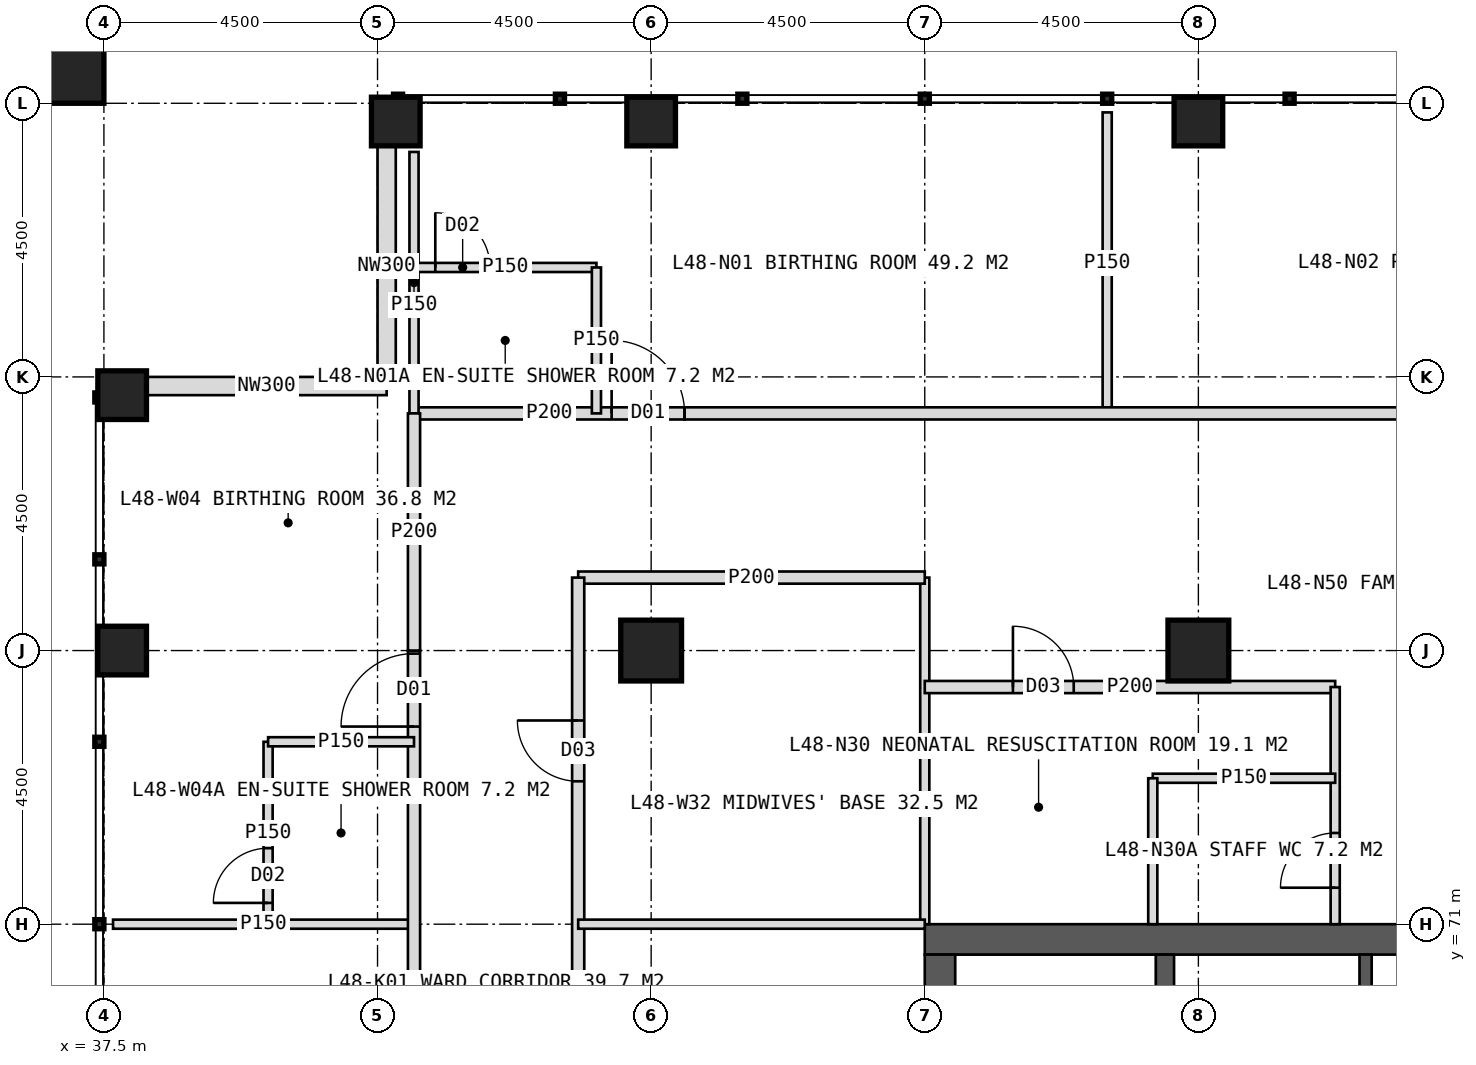
"""IFC4 building model, lengths in metres.
Left out: names, types, materials, properties, quantities, classifications, styles, units other than length and angle.
Written with IfcOpenShell. Run it as: python <this file> out.ifc"""

import sys

from ifc_helpers import new_model, si_unit, direction, frame, frame_2d, origin, origin_2d, place, context, subcontext, project, spatial, rectangle, hollow_rectangle, extrude, element, fill, save


model = new_model("IFC4")
c1 = context("Model", 3, precision=1e-05, world=origin(), true_north=direction((0.0, 1.0)))
c2 = subcontext(c1, "Body", "Model", "MODEL_VIEW")
j1 = project(units=[si_unit("LENGTHUNIT", "METRE"), si_unit("PLANEANGLEUNIT", "RADIAN")], contexts=[c1])
p1 = place(None, origin())
s1 = spatial("IfcSite", under=j1, at=p1, CompositionType="ELEMENT")
p2 = place(p1, origin())
s2 = spatial("IfcBuilding", under=s1, at=p2, CompositionType="ELEMENT")
p3 = place(p2, frame((0.0, 0.0, 201.0)))
s3 = spatial("IfcBuildingStorey", under=s2, at=p3, CompositionType="ELEMENT", Elevation=201.0)
p4 = place(p3, frame((51.0, 70.75, 0.0), z_axis=(0.0, 0.0, 1.0), x_axis=(1.0, 0.0, 0.0)))
e1 = element("IfcWall", 1, at=p4, inside=s3, PredefinedType="SHEAR", context=c2, shape_type="SweptSolid", body=[
    extrude(rectangle(XDim=18.0, YDim=0.5, at=frame_2d((9.0, 0.0))), origin(), (0.0, 0.0, 1.0), 4.0),
])
p5 = place(p4, frame((8.1, 0.0, 0.0)))
e2 = element("IfcOpeningElement", 2, at=p5, cuts=e1, PredefinedType="OPENING", context=c2, shape_type="SweptSolid", body=[
    extrude(rectangle(XDim=1.8, YDim=2.2, at=frame_2d((0.9, 1.1))), frame((0.0, 0.26, 0.0), z_axis=(0.0, -1.0, 0.0), x_axis=(1.0, 0.0, 0.0)), (0.0, 0.0, 1.0), 0.52),
])
p6 = place(p3, frame((51.25, 53.5, 0.0), z_axis=(0.0, 0.0, 1.0), x_axis=(0.0, 1.0, 0.0)))
e3 = element("IfcWall", 3, at=p6, inside=s3, PredefinedType="SHEAR", context=c2, shape_type="SweptSolid", body=[
    extrude(rectangle(XDim=17.0, YDim=0.5, at=frame_2d((8.5, 0.0))), origin(), (0.0, 0.0, 1.0), 4.0),
])
p7 = place(p6, frame((6.1, 0.0, 0.0)))
e4 = element("IfcOpeningElement", 4, at=p7, cuts=e3, PredefinedType="OPENING", context=c2, shape_type="SweptSolid", body=[
    extrude(rectangle(XDim=1.5, YDim=2.2, at=frame_2d((0.75, 1.1))), frame((0.0, 0.26, 0.0), z_axis=(0.0, -1.0, 0.0), x_axis=(1.0, 0.0, 0.0)), (0.0, 0.0, 1.0), 0.52),
])
p8 = place(p3, frame((54.95, 53.5, 0.0), z_axis=(0.0, 0.0, 1.0), x_axis=(0.0, 1.0, 0.0)))
e5 = element("IfcWall", 5, at=p8, inside=s3, PredefinedType="SHEAR", context=c2, shape_type="SweptSolid", body=[
    extrude(rectangle(XDim=17.0, YDim=0.3, at=frame_2d((8.5, 0.0))), origin(), (0.0, 0.0, 1.0), 4.0),
])
p9 = place(p3, frame((58.25, 53.5, 0.0), z_axis=(0.0, 0.0, 1.0), x_axis=(0.0, 1.0, 0.0)))
e6 = element("IfcWall", 6, at=p9, inside=s3, PredefinedType="SHEAR", context=c2, shape_type="SweptSolid", body=[
    extrude(rectangle(XDim=17.0, YDim=0.2, at=frame_2d((8.5, 0.0))), origin(), (0.0, 0.0, 1.0), 4.0),
])
p10 = place(p9, frame((0.393, 0.0, 0.0)))
e7 = element("IfcOpeningElement", 7, at=p10, cuts=e6, PredefinedType="OPENING", context=c2, shape_type="SweptSolid", body=[
    extrude(rectangle(XDim=1.0, YDim=2.1, at=frame_2d((0.5, 1.05))), frame((0.0, 0.11, 0.0), z_axis=(0.0, -1.0, 0.0), x_axis=(1.0, 0.0, 0.0)), (0.0, 0.0, 1.0), 0.22),
])
p11 = place(p9, frame((2.542, 0.0, 0.0)))
e8 = element("IfcOpeningElement", 8, at=p11, cuts=e6, PredefinedType="OPENING", context=c2, shape_type="SweptSolid", body=[
    extrude(rectangle(XDim=1.0, YDim=2.1, at=frame_2d((0.5, 1.05))), frame((0.0, 0.11, 0.0), z_axis=(0.0, -1.0, 0.0), x_axis=(1.0, 0.0, 0.0)), (0.0, 0.0, 1.0), 0.22),
])
p12 = place(p9, frame((5.127, 0.0, 0.0)))
e9 = element("IfcOpeningElement", 9, at=p12, cuts=e6, PredefinedType="OPENING", context=c2, shape_type="SweptSolid", body=[
    extrude(rectangle(XDim=1.0, YDim=2.1, at=frame_2d((0.5, 1.05))), frame((0.0, 0.11, 0.0), z_axis=(0.0, -1.0, 0.0), x_axis=(1.0, 0.0, 0.0)), (0.0, 0.0, 1.0), 0.22),
])
p13 = place(p9, frame((7.228, 0.0, 0.0)))
e10 = element("IfcOpeningElement", 10, at=p13, cuts=e6, PredefinedType="OPENING", context=c2, shape_type="SweptSolid", body=[
    extrude(rectangle(XDim=1.0, YDim=2.1, at=frame_2d((0.5, 1.05))), frame((0.0, 0.11, 0.0), z_axis=(0.0, -1.0, 0.0), x_axis=(1.0, 0.0, 0.0)), (0.0, 0.0, 1.0), 0.22),
])
p14 = place(p9, frame((10.025, 0.0, 0.0)))
e11 = element("IfcOpeningElement", 11, at=p14, cuts=e6, PredefinedType="OPENING", context=c2, shape_type="SweptSolid", body=[
    extrude(rectangle(XDim=1.4, YDim=2.2, at=frame_2d((0.7, 1.1))), frame((0.0, 0.11, 0.0), z_axis=(0.0, -1.0, 0.0), x_axis=(1.0, 0.0, 0.0)), (0.0, 0.0, 1.0), 0.22),
])
p15 = place(p9, frame((14.325, 0.0, 0.0)))
e12 = element("IfcOpeningElement", 12, at=p15, cuts=e6, PredefinedType="OPENING", context=c2, shape_type="SweptSolid", body=[
    extrude(rectangle(XDim=1.4, YDim=2.2, at=frame_2d((0.7, 1.1))), frame((0.0, 0.11, 0.0), z_axis=(0.0, -1.0, 0.0), x_axis=(1.0, 0.0, 0.0)), (0.0, 0.0, 1.0), 0.22),
])
for number, where, z_axis, x_axis in (
    (13, (46.5, 75.5, 0.0), (0.0, 0.0, 1.0), (1.0, 0.0, 0.0)),
    (14, (55.5, 75.5, 0.0), (0.0, 0.0, 1.0), (1.0, 0.0, 0.0)),
):
    element("IfcColumn", number, at=place(p3, frame(where, z_axis=z_axis, x_axis=x_axis)), inside=s3, PredefinedType="COLUMN", context=c2, shape_type="SweptSolid", body=[
        extrude(hollow_rectangle(XDim=1.0, YDim=1.0, WallThickness=0.1, at=origin_2d()), origin(), (0.0, 0.0, 1.0), 4.0),
    ])
for number, where, z_axis, x_axis in (
    (15, (42.3, 84.2, 0.0), (0.0, 0.0, 1.0), (1.0, 0.0, 0.0)),
    (16, (46.5, 84.2, 0.0), (0.0, 0.0, 1.0), (1.0, 0.0, 0.0)),
    (17, (55.5, 84.2, 0.0), (0.0, 0.0, 1.0), (1.0, 0.0, 0.0)),
    (18, (37.8, 75.5, 0.0), (0.0, 0.0, 1.0), (1.0, 0.0, 0.0)),
    (19, (37.8, 79.7, 0.0), (0.0, 0.0, 1.0), (1.0, 0.0, 0.0)),
):
    element("IfcColumn", number, at=place(p3, frame(where, z_axis=z_axis, x_axis=x_axis)), inside=s3, PredefinedType="COLUMN", context=c2, shape_type="SweptSolid", body=[
        extrude(hollow_rectangle(XDim=0.8, YDim=0.8, WallThickness=0.08, at=origin_2d()), origin(), (0.0, 0.0, 1.0), 4.0),
    ])
p16 = place(p3, frame((36.9, 85.1, 0.0), z_axis=(0.0, 0.0, 1.0), x_axis=(1.0, 0.0, 0.0)))
e20 = element("IfcColumn", 20, at=p16, inside=s3, PredefinedType="COLUMN", context=c2, shape_type="SweptSolid", body=[
    extrude(hollow_rectangle(XDim=1.2, YDim=1.2, WallThickness=0.07, at=origin_2d()), origin(), (0.0, 0.0, 1.0), 4.0),
])
for number, where, z_axis, x_axis in (
    (21, (38.2, 79.85, 0.0), (0.0, 0.0, 1.0), (1.0, 0.0, 0.0)),
    (22, (42.15, 79.85, 0.0), (0.0, 0.0, 1.0), (0.0, 1.0, 0.0)),
):
    element("IfcWall", number, at=place(p3, frame(where, z_axis=z_axis, x_axis=x_axis)), inside=s3, PredefinedType="ELEMENTEDWALL", context=c2, shape_type="SweptSolid", body=[
        extrude(rectangle(XDim=3.95, YDim=0.3, at=frame_2d((1.975, 0.0))), origin(), (0.0, 0.0, 1.0), 2.85),
    ])
p17 = place(p3, frame((54.0, 79.4, 0.0), z_axis=(0.0, 0.0, 1.0), x_axis=(0.0, 1.0, 0.0)))
e23 = element("IfcWall", 23, at=p17, inside=s3, PredefinedType="PARTITIONING", context=c2, shape_type="SweptSolid", body=[
    extrude(rectangle(XDim=4.95, YDim=0.15, at=frame_2d((2.475, 0.0))), origin(), (0.0, 0.0, 1.0), 3.75),
])
p18 = place(p3, frame((42.6, 79.4, 0.0), z_axis=(0.0, 0.0, 1.0), x_axis=(1.0, 0.0, 0.0)))
e24 = element("IfcWall", 24, at=p18, inside=s3, PredefinedType="PARTITIONING", context=c2, shape_type="SweptSolid", body=[
    extrude(rectangle(XDim=4.45, YDim=0.2, at=frame_2d((2.225, 0.0))), origin(), (0.0, 0.0, 1.0), 2.85),
])
p19 = place(p18, frame((3.25, 0.0, 0.0)))
e25 = element("IfcOpeningElement", 25, at=p19, cuts=e24, PredefinedType="OPENING", context=c2, shape_type="SweptSolid", body=[
    extrude(rectangle(XDim=1.2, YDim=2.2, at=frame_2d((0.6, 1.1))), frame((0.0, 0.11, 0.0), z_axis=(0.0, -1.0, 0.0), x_axis=(1.0, 0.0, 0.0)), (0.0, 0.0, 1.0), 0.22),
])
p20 = place(p3, frame((47.05, 79.4, 0.0), z_axis=(0.0, 0.0, 1.0), x_axis=(1.0, 0.0, 0.0)))
e26 = element("IfcWall", 26, at=p20, inside=s3, PredefinedType="PARTITIONING", context=c2, shape_type="SweptSolid", body=[
    extrude(rectangle(XDim=26.45, YDim=0.2, at=frame_2d((13.225, 0.0))), origin(), (0.0, 0.0, 1.0), 3.75),
])
p21 = place(p20, frame((12.45, 0.0, 0.0)))
e27 = element("IfcOpeningElement", 27, at=p21, cuts=e26, PredefinedType="OPENING", context=c2, shape_type="SweptSolid", body=[
    extrude(rectangle(XDim=1.0, YDim=2.1, at=frame_2d((0.5, 1.05))), frame((0.0, 0.11, 0.0), z_axis=(0.0, -1.0, 0.0), x_axis=(1.0, 0.0, 0.0)), (0.0, 0.0, 1.0), 0.22),
])
p22 = place(p20, frame((22.2, 0.0, 0.0)))
e28 = element("IfcOpeningElement", 28, at=p22, cuts=e26, PredefinedType="OPENING", context=c2, shape_type="SweptSolid", body=[
    extrude(rectangle(XDim=1.2, YDim=2.2, at=frame_2d((0.6, 1.1))), frame((0.0, 0.11, 0.0), z_axis=(0.0, -1.0, 0.0), x_axis=(1.0, 0.0, 0.0)), (0.0, 0.0, 1.0), 0.22),
])
p23 = place(p3, frame((42.6, 79.4, 0.0), z_axis=(0.0, 0.0, 1.0), x_axis=(0.0, 1.0, 0.0)))
e29 = element("IfcWall", 29, at=p23, inside=s3, PredefinedType="PARTITIONING", context=c2, shape_type="SweptSolid", body=[
    extrude(rectangle(XDim=4.3, YDim=0.15, at=frame_2d((2.15, 0.0))), origin(), (0.0, 0.0, 1.0), 2.85),
])
p24 = place(p3, frame((42.6, 81.8, 0.0), z_axis=(0.0, 0.0, 1.0), x_axis=(1.0, 0.0, 0.0)))
e30 = element("IfcWall", 30, at=p24, inside=s3, PredefinedType="PARTITIONING", context=c2, shape_type="SweptSolid", body=[
    extrude(rectangle(XDim=3.0, YDim=0.15, at=frame_2d((1.5, 0.0))), origin(), (0.0, 0.0, 1.0), 3.75),
])
p25 = place(p24, frame((0.35, 0.0, 0.0)))
e31 = element("IfcOpeningElement", 31, at=p25, cuts=e30, PredefinedType="OPENING", context=c2, shape_type="SweptSolid", body=[
    extrude(rectangle(XDim=0.9, YDim=2.1, at=frame_2d((0.45, 1.05))), frame((0.0, 0.085, 0.0), z_axis=(0.0, -1.0, 0.0), x_axis=(1.0, 0.0, 0.0)), (0.0, 0.0, 1.0), 0.17),
])
p26 = place(p3, frame((45.6, 79.4, 0.0), z_axis=(0.0, 0.0, 1.0), x_axis=(0.0, 1.0, 0.0)))
e32 = element("IfcWall", 32, at=p26, inside=s3, PredefinedType="PARTITIONING", context=c2, shape_type="SweptSolid", body=[
    extrude(rectangle(XDim=2.4, YDim=0.15, at=frame_2d((1.2, 0.0))), origin(), (0.0, 0.0, 1.0), 3.75),
])
p27 = place(p3, frame((51.0, 71.0, 0.0), z_axis=(0.0, 0.0, 1.0), x_axis=(0.0, 1.0, 0.0)))
e33 = element("IfcWall", 33, at=p27, inside=s3, PredefinedType="PARTITIONING", context=c2, shape_type="SweptSolid", body=[
    extrude(rectangle(XDim=5.7, YDim=0.15, at=frame_2d((2.85, 0.0))), origin(), (0.0, 0.0, 1.0), 3.75),
])
p28 = place(p3, frame((45.3, 76.7, 0.0), z_axis=(0.0, 0.0, 1.0), x_axis=(1.0, 0.0, 0.0)))
e34 = element("IfcWall", 34, at=p28, inside=s3, PredefinedType="PARTITIONING", context=c2, shape_type="SweptSolid", body=[
    extrude(rectangle(XDim=5.7, YDim=0.2, at=frame_2d((2.85, 0.0))), origin(), (0.0, 0.0, 1.0), 3.75),
])
p29 = place(p3, frame((51.0, 74.9, 0.0), z_axis=(0.0, 0.0, 1.0), x_axis=(1.0, 0.0, 0.0)))
e35 = element("IfcWall", 35, at=p29, inside=s3, PredefinedType="PARTITIONING", context=c2, shape_type="SweptSolid", body=[
    extrude(rectangle(XDim=6.75, YDim=0.2, at=frame_2d((3.375, 0.0))), origin(), (0.0, 0.0, 1.0), 3.75),
])
p30 = place(p29, frame((1.45, 0.0, 0.0)))
e36 = element("IfcOpeningElement", 36, at=p30, cuts=e35, PredefinedType="OPENING", context=c2, shape_type="SweptSolid", body=[
    extrude(rectangle(XDim=1.0, YDim=2.1, at=frame_2d((0.5, 1.05))), frame((0.0, 0.11, 0.0), z_axis=(0.0, -1.0, 0.0), x_axis=(1.0, 0.0, 0.0)), (0.0, 0.0, 1.0), 0.22),
])
p31 = place(p3, frame((57.75, 71.0, 0.0), z_axis=(0.0, 0.0, 1.0), x_axis=(0.0, 1.0, 0.0)))
e37 = element("IfcWall", 37, at=p31, inside=s3, PredefinedType="PARTITIONING", context=c2, shape_type="SweptSolid", body=[
    extrude(rectangle(XDim=3.9, YDim=0.15, at=frame_2d((1.95, 0.0))), origin(), (0.0, 0.0, 1.0), 3.75),
])
p32 = place(p31, frame((0.6, 0.0, 0.0)))
e38 = element("IfcOpeningElement", 38, at=p32, cuts=e37, PredefinedType="OPENING", context=c2, shape_type="SweptSolid", body=[
    extrude(rectangle(XDim=0.9, YDim=2.1, at=frame_2d((0.45, 1.05))), frame((0.0, 0.085, 0.0), z_axis=(0.0, -1.0, 0.0), x_axis=(1.0, 0.0, 0.0)), (0.0, 0.0, 1.0), 0.17),
])
p33 = place(p3, frame((54.75, 73.4, 0.0), z_axis=(0.0, 0.0, 1.0), x_axis=(1.0, 0.0, 0.0)))
e39 = element("IfcWall", 39, at=p33, inside=s3, PredefinedType="PARTITIONING", context=c2, shape_type="SweptSolid", body=[
    extrude(rectangle(XDim=3.0, YDim=0.15, at=frame_2d((1.5, 0.0))), origin(), (0.0, 0.0, 1.0), 3.75),
])
p34 = place(p3, frame((54.75, 71.0, 0.0), z_axis=(0.0, 0.0, 1.0), x_axis=(0.0, 1.0, 0.0)))
e40 = element("IfcWall", 40, at=p34, inside=s3, PredefinedType="PARTITIONING", context=c2, shape_type="SweptSolid", body=[
    extrude(rectangle(XDim=2.4, YDim=0.15, at=frame_2d((1.2, 0.0))), origin(), (0.0, 0.0, 1.0), 3.75),
])
p35 = place(p3, frame((42.6, 71.0, 0.0), z_axis=(0.0, 0.0, 1.0), x_axis=(-1.0, 0.0, 0.0)))
e41 = element("IfcWall", 41, at=p35, inside=s3, PredefinedType="PARTITIONING", context=c2, shape_type="SweptSolid", body=[
    extrude(rectangle(XDim=4.95, YDim=0.15, at=frame_2d((2.475, 0.0))), origin(), (0.0, 0.0, 1.0), 3.75),
])
p36 = place(p3, frame((42.6, 49.05, 0.0), z_axis=(0.0, 0.0, 1.0), x_axis=(0.0, 1.0, 0.0)))
e42 = element("IfcWall", 42, at=p36, inside=s3, PredefinedType="PARTITIONING", context=c2, shape_type="SweptSolid", body=[
    extrude(rectangle(XDim=26.45, YDim=0.2, at=frame_2d((13.225, 0.0))), origin(), (0.0, 0.0, 1.0), 3.75),
])
p37 = place(p36, frame((7.2, 0.0, 0.0)))
e43 = element("IfcOpeningElement", 43, at=p37, cuts=e42, PredefinedType="OPENING", context=c2, shape_type="SweptSolid", body=[
    extrude(rectangle(XDim=1.2, YDim=2.2, at=frame_2d((0.6, 1.1))), frame((0.0, 0.11, 0.0), z_axis=(0.0, -1.0, 0.0), x_axis=(1.0, 0.0, 0.0)), (0.0, 0.0, 1.0), 0.22),
])
p38 = place(p36, frame((16.2, 0.0, 0.0)))
e44 = element("IfcOpeningElement", 44, at=p38, cuts=e42, PredefinedType="OPENING", context=c2, shape_type="SweptSolid", body=[
    extrude(rectangle(XDim=1.2, YDim=2.2, at=frame_2d((0.6, 1.1))), frame((0.0, 0.11, 0.0), z_axis=(0.0, -1.0, 0.0), x_axis=(1.0, 0.0, 0.0)), (0.0, 0.0, 1.0), 0.22),
])
p39 = place(p36, frame((25.2, 0.0, 0.0)))
e45 = element("IfcOpeningElement", 45, at=p39, cuts=e42, PredefinedType="OPENING", context=c2, shape_type="SweptSolid", body=[
    extrude(rectangle(XDim=1.2, YDim=2.2, at=frame_2d((0.6, 1.1))), frame((0.0, 0.11, 0.0), z_axis=(0.0, -1.0, 0.0), x_axis=(1.0, 0.0, 0.0)), (0.0, 0.0, 1.0), 0.22),
])
p40 = place(p3, frame((42.6, 75.5, 0.0), z_axis=(0.0, 0.0, 1.0), x_axis=(0.0, 1.0, 0.0)))
e46 = element("IfcWall", 46, at=p40, inside=s3, PredefinedType="PARTITIONING", context=c2, shape_type="SweptSolid", body=[
    extrude(rectangle(XDim=3.9, YDim=0.2, at=frame_2d((1.95, 0.0))), origin(), (0.0, 0.0, 1.0), 2.85),
])
p41 = place(p3, frame((40.2, 71.0, 0.0), z_axis=(0.0, 0.0, 1.0), x_axis=(0.0, 1.0, 0.0)))
e47 = element("IfcWall", 47, at=p41, inside=s3, PredefinedType="PARTITIONING", context=c2, shape_type="SweptSolid", body=[
    extrude(rectangle(XDim=3.0, YDim=0.15, at=frame_2d((1.5, 0.0))), origin(), (0.0, 0.0, 1.0), 3.75),
])
p42 = place(p41, frame((0.35, 0.0, 0.0)))
e48 = element("IfcOpeningElement", 48, at=p42, cuts=e47, PredefinedType="OPENING", context=c2, shape_type="SweptSolid", body=[
    extrude(rectangle(XDim=0.9, YDim=2.1, at=frame_2d((0.45, 1.05))), frame((0.0, 0.085, 0.0), z_axis=(0.0, -1.0, 0.0), x_axis=(1.0, 0.0, 0.0)), (0.0, 0.0, 1.0), 0.17),
])
p43 = place(p3, frame((42.6, 74.0, 0.0), z_axis=(0.0, 0.0, 1.0), x_axis=(-1.0, 0.0, 0.0)))
e49 = element("IfcWall", 49, at=p43, inside=s3, PredefinedType="PARTITIONING", context=c2, shape_type="SweptSolid", body=[
    extrude(rectangle(XDim=2.4, YDim=0.15, at=frame_2d((1.2, 0.0))), origin(), (0.0, 0.0, 1.0), 3.75),
])
p44 = place(p3, frame((45.3, 62.0, 0.0), z_axis=(0.0, 0.0, 1.0), x_axis=(0.0, 1.0, 0.0)))
e50 = element("IfcWall", 50, at=p44, inside=s3, PredefinedType="PARTITIONING", context=c2, shape_type="SweptSolid", body=[
    extrude(rectangle(XDim=14.7, YDim=0.2, at=frame_2d((7.35, 0.0))), origin(), (0.0, 0.0, 1.0), 3.75),
])
p45 = place(p44, frame((1.45, 0.0, 0.0)))
e51 = element("IfcOpeningElement", 51, at=p45, cuts=e50, PredefinedType="OPENING", context=c2, shape_type="SweptSolid", body=[
    extrude(rectangle(XDim=1.0, YDim=2.1, at=frame_2d((0.5, 1.05))), frame((0.0, 0.11, 0.0), z_axis=(0.0, -1.0, 0.0), x_axis=(1.0, 0.0, 0.0)), (0.0, 0.0, 1.0), 0.22),
])
p46 = place(p44, frame((11.35, 0.0, 0.0)))
e52 = element("IfcOpeningElement", 52, at=p46, cuts=e50, PredefinedType="OPENING", context=c2, shape_type="SweptSolid", body=[
    extrude(rectangle(XDim=1.0, YDim=2.1, at=frame_2d((0.5, 1.05))), frame((0.0, 0.11, 0.0), z_axis=(0.0, -1.0, 0.0), x_axis=(1.0, 0.0, 0.0)), (0.0, 0.0, 1.0), 0.22),
])
p47 = place(p3, frame((51.0, 71.0, 0.0), z_axis=(0.0, 0.0, 1.0), x_axis=(-1.0, 0.0, 0.0)))
e53 = element("IfcWall", 53, at=p47, inside=s3, PredefinedType="PARTITIONING", context=c2, shape_type="SweptSolid", body=[
    extrude(rectangle(XDim=5.7, YDim=0.15, at=frame_2d((2.85, 0.0))), origin(), (0.0, 0.0, 1.0), 3.75),
])
p48 = place(p19, origin())
e54 = element("IfcDoor", 54, at=p48, inside=s3, OperationType="SINGLE_SWING_LEFT", PredefinedType="DOOR", context=c2, shape_type="SweptSolid", body=[
    extrude(rectangle(XDim=1.2, YDim=2.2, at=frame_2d((0.6, 1.1))), frame((0.0, 0.025, 0.0), z_axis=(0.0, -1.0, 0.0), x_axis=(1.0, 0.0, 0.0)), (0.0, 0.0, 1.0), 0.05),
])
fill(e25, e54)
p49 = place(p25, origin())
e55 = element("IfcDoor", 55, at=p49, inside=s3, OperationType="SINGLE_SWING_LEFT", PredefinedType="DOOR", context=c2, shape_type="SweptSolid", body=[
    extrude(rectangle(XDim=0.9, YDim=2.1, at=frame_2d((0.45, 1.05))), frame((0.0, 0.025, 0.0), z_axis=(0.0, -1.0, 0.0), x_axis=(1.0, 0.0, 0.0)), (0.0, 0.0, 1.0), 0.05),
])
fill(e31, e55)
p50 = place(p32, origin())
e56 = element("IfcDoor", 56, at=p50, inside=s3, OperationType="SINGLE_SWING_LEFT", PredefinedType="DOOR", context=c2, shape_type="SweptSolid", body=[
    extrude(rectangle(XDim=0.9, YDim=2.1, at=frame_2d((0.45, 1.05))), frame((0.0, 0.025, 0.0), z_axis=(0.0, -1.0, 0.0), x_axis=(1.0, 0.0, 0.0)), (0.0, 0.0, 1.0), 0.05),
])
fill(e38, e56)
p51 = place(p30, origin())
e57 = element("IfcDoor", 57, at=p51, inside=s3, OperationType="SINGLE_SWING_LEFT", PredefinedType="DOOR", context=c2, shape_type="SweptSolid", body=[
    extrude(rectangle(XDim=1.0, YDim=2.1, at=frame_2d((0.5, 1.05))), frame((0.0, 0.025, 0.0), z_axis=(0.0, -1.0, 0.0), x_axis=(1.0, 0.0, 0.0)), (0.0, 0.0, 1.0), 0.05),
])
fill(e36, e57)
p52 = place(p39, origin())
e58 = element("IfcDoor", 58, at=p52, inside=s3, OperationType="SINGLE_SWING_LEFT", PredefinedType="DOOR", context=c2, shape_type="SweptSolid", body=[
    extrude(rectangle(XDim=1.2, YDim=2.2, at=frame_2d((0.6, 1.1))), frame((0.0, 0.025, 0.0), z_axis=(0.0, -1.0, 0.0), x_axis=(1.0, 0.0, 0.0)), (0.0, 0.0, 1.0), 0.05),
])
fill(e45, e58)
p53 = place(p42, origin())
e59 = element("IfcDoor", 59, at=p53, inside=s3, OperationType="SINGLE_SWING_LEFT", PredefinedType="DOOR", context=c2, shape_type="SweptSolid", body=[
    extrude(rectangle(XDim=0.9, YDim=2.1, at=frame_2d((0.45, 1.05))), frame((0.0, 0.025, 0.0), z_axis=(0.0, -1.0, 0.0), x_axis=(1.0, 0.0, 0.0)), (0.0, 0.0, 1.0), 0.05),
])
fill(e48, e59)
p54 = place(p46, origin())
e60 = element("IfcDoor", 60, at=p54, inside=s3, OperationType="SINGLE_SWING_RIGHT", PredefinedType="DOOR", context=c2, shape_type="SweptSolid", body=[
    extrude(rectangle(XDim=1.0, YDim=2.1, at=frame_2d((0.5, 1.05))), frame((0.0, 0.025, 0.0), z_axis=(0.0, -1.0, 0.0), x_axis=(1.0, 0.0, 0.0)), (0.0, 0.0, 1.0), 0.05),
])
fill(e52, e60)
save(model, sys.argv[1])
